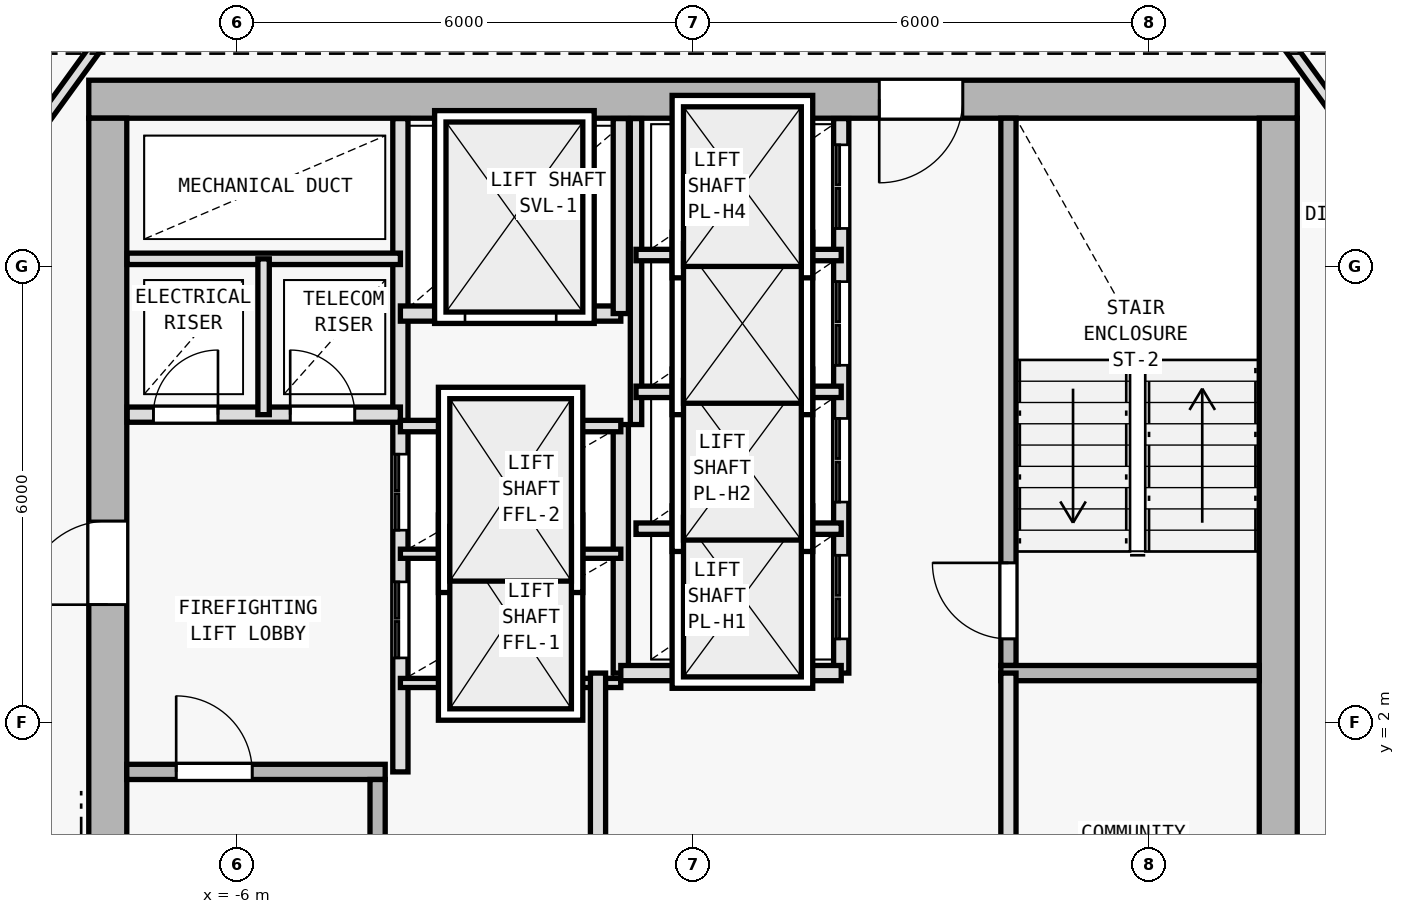
"""IFC4 building model, lengths in metres.
Left out: names, types, materials, properties, quantities, classifications, styles, units other than length and angle.
Written with IfcOpenShell. Run it as: python <this file> out.ifc"""

import sys

from ifc_helpers import new_model, si_unit, direction, frame, frame_2d, origin, origin_2d, place, context, subcontext, project, spatial, rectangle, i_section, extrude, element, fill, save


model = new_model("IFC4")
c1 = context("Model", 3, precision=1e-05, world=origin(), true_north=direction((0.0, 1.0)))
c2 = subcontext(c1, "Body", "Model", "MODEL_VIEW")
j1 = project(units=[si_unit("LENGTHUNIT", "METRE"), si_unit("PLANEANGLEUNIT", "RADIAN")], contexts=[c1])
p1 = place(None, origin())
s1 = spatial("IfcSite", under=j1, at=p1, CompositionType="ELEMENT")
p2 = place(p1, origin())
s2 = spatial("IfcBuilding", under=s1, at=p2, CompositionType="ELEMENT")
p3 = place(p2, frame((0.0, 0.0, 283.2)))
s3 = spatial("IfcBuildingStorey", under=s2, at=p3, CompositionType="ELEMENT", Elevation=283.2)
for number, where, z_axis, x_axis in (
    (1, (7.7, 10.2, 0.0), (0.0, 0.0, 1.0), (1.0, 0.0, 0.0)),
    (2, (-7.7, 10.2, 0.0), (0.0, 0.0, 1.0), (1.0, 0.0, 0.0)),
    (3, (7.7, 0.4, 0.0), (0.0, 0.0, 1.0), (1.0, 0.0, 0.0)),
    (4, (-7.7, 2.0, 0.0), (0.0, 0.0, 1.0), (1.0, 0.0, 0.0)),
):
    element("IfcColumn", number, at=place(p3, frame(where, z_axis=z_axis, x_axis=x_axis)), inside=s3, PredefinedType="COLUMN", context=c2, shape_type="SweptSolid", body=[
        extrude(i_section(OverallWidth=0.374, OverallDepth=0.372, WebThickness=0.012, FlangeThickness=0.02, FilletRadius=0.015, at=origin_2d()), origin(), (0.0, 0.0, 1.0), 3.6),
    ])
p4 = place(p3, frame((7.95, 10.2, 0.0), z_axis=(0.0, 0.0, 1.0), x_axis=(-1.0, 0.0, 0.0)))
e5 = element("IfcWall", 5, at=p4, inside=s3, PredefinedType="SHEAR", context=c2, shape_type="SweptSolid", body=[
    extrude(rectangle(XDim=15.9, YDim=0.5, at=frame_2d((7.95, 0.0))), origin(), (0.0, 0.0, 1.0), 3.35),
])
p5 = place(p4, frame((4.4, 0.0, 0.0)))
e6 = element("IfcOpeningElement", 6, at=p5, cuts=e5, PredefinedType="OPENING", context=c2, shape_type="SweptSolid", body=[
    extrude(rectangle(XDim=1.1, YDim=2.15, at=frame_2d((0.55, 1.075))), frame((0.0, 0.26, 0.0), z_axis=(0.0, -1.0, 0.0), x_axis=(1.0, 0.0, 0.0)), (0.0, 0.0, 1.0), 0.52),
])
p6 = place(p3, frame((-7.7, -9.15, 0.0), z_axis=(0.0, 0.0, 1.0), x_axis=(0.0, 1.0, 0.0)))
e7 = element("IfcWall", 7, at=p6, inside=s3, PredefinedType="SHEAR", context=c2, shape_type="SweptSolid", body=[
    extrude(rectangle(XDim=19.1, YDim=0.5, at=frame_2d((9.55, 0.0))), origin(), (0.0, 0.0, 1.0), 3.35),
])
p7 = place(p6, frame((12.7, 0.0, 0.0)))
e8 = element("IfcOpeningElement", 8, at=p7, cuts=e7, PredefinedType="OPENING", context=c2, shape_type="SweptSolid", body=[
    extrude(rectangle(XDim=1.1, YDim=2.15, at=frame_2d((0.55, 1.075))), frame((0.0, 0.26, 0.0), z_axis=(0.0, -1.0, 0.0), x_axis=(1.0, 0.0, 0.0)), (0.0, 0.0, 1.0), 0.52),
])
p8 = place(p3, frame((7.7, 9.95, 0.0), z_axis=(0.0, 0.0, 1.0), x_axis=(0.0, -1.0, 0.0)))
e9 = element("IfcWall", 9, at=p8, inside=s3, PredefinedType="SHEAR", context=c2, shape_type="SweptSolid", body=[
    extrude(rectangle(XDim=19.1, YDim=0.5, at=frame_2d((9.55, 0.0))), origin(), (0.0, 0.0, 1.0), 3.35),
])
p9 = place(p3, frame((-7.45, 1.35, 0.0), z_axis=(0.0, 0.0, 1.0), x_axis=(1.0, 0.0, 0.0)))
e10 = element("IfcWall", 10, at=p9, inside=s3, PredefinedType="SOLIDWALL", context=c2, shape_type="SweptSolid", body=[
    extrude(rectangle(XDim=3.4, YDim=0.2, at=frame_2d((1.7, 0.0))), origin(), (0.0, 0.0, 1.0), 3.35),
])
p10 = place(p9, frame((0.65, 0.0, 0.0)))
e11 = element("IfcOpeningElement", 11, at=p10, cuts=e10, PredefinedType="OPENING", context=c2, shape_type="SweptSolid", body=[
    extrude(rectangle(XDim=1.0, YDim=2.15, at=frame_2d((0.5, 1.075))), frame((0.0, 0.11, 0.0), z_axis=(0.0, -1.0, 0.0), x_axis=(1.0, 0.0, 0.0)), (0.0, 0.0, 1.0), 0.22),
])
p11 = place(p3, frame((-4.15, -5.95, 0.0), z_axis=(0.0, 0.0, 1.0), x_axis=(0.0, 1.0, 0.0)))
e12 = element("IfcWall", 12, at=p11, inside=s3, PredefinedType="SOLIDWALL", context=c2, shape_type="SweptSolid", body=[
    extrude(rectangle(XDim=7.2, YDim=0.2, at=frame_2d((3.6, 0.0))), origin(), (0.0, 0.0, 1.0), 3.35),
])
p12 = place(p3, frame((-3.85, 1.35, 0.0), z_axis=(0.0, 0.0, 1.0), x_axis=(0.0, 1.0, 0.0)))
e13 = element("IfcWall", 13, at=p12, inside=s3, PredefinedType="SOLIDWALL", context=c2, shape_type="SweptSolid", body=[
    extrude(rectangle(XDim=8.595, YDim=0.2, at=frame_2d((4.297, 0.0))), origin(), (0.0, 0.0, 1.0), 3.35),
])
p13 = place(p12, frame((1.5, 0.0, 0.0)))
e14 = element("IfcOpeningElement", 14, at=p13, cuts=e13, PredefinedType="OPENING", context=c2, shape_type="SweptSolid", body=[
    extrude(rectangle(XDim=1.0, YDim=2.15, at=frame_2d((0.5, 1.075))), frame((0.0, 0.11, 0.0), z_axis=(0.0, -1.0, 0.0), x_axis=(1.0, 0.0, 0.0)), (0.0, 0.0, 1.0), 0.22),
])
p14 = place(p12, frame((3.18, 0.0, 0.0)))
e15 = element("IfcOpeningElement", 15, at=p14, cuts=e13, PredefinedType="OPENING", context=c2, shape_type="SweptSolid", body=[
    extrude(rectangle(XDim=1.0, YDim=2.15, at=frame_2d((0.5, 1.075))), frame((0.0, 0.11, 0.0), z_axis=(0.0, -1.0, 0.0), x_axis=(1.0, 0.0, 0.0)), (0.0, 0.0, 1.0), 0.22),
])
p15 = place(p3, frame((-7.445, 6.05, 0.0), z_axis=(0.0, 0.0, 1.0), x_axis=(1.0, 0.0, 0.0)))
e16 = element("IfcWall", 16, at=p15, inside=s3, PredefinedType="SOLIDWALL", context=c2, shape_type="SweptSolid", body=[
    extrude(rectangle(XDim=3.595, YDim=0.2, at=frame_2d((1.797, 0.0))), origin(), (0.0, 0.0, 1.0), 3.35),
])
p16 = place(p15, frame((0.345, 0.0, 0.0)))
e17 = element("IfcOpeningElement", 17, at=p16, cuts=e16, PredefinedType="OPENING", context=c2, shape_type="SweptSolid", body=[
    extrude(rectangle(XDim=0.85, YDim=2.1, at=frame_2d((0.425, 1.05))), frame((0.0, 0.11, 0.0), z_axis=(0.0, -1.0, 0.0), x_axis=(1.0, 0.0, 0.0)), (0.0, 0.0, 1.0), 0.22),
])
p17 = place(p15, frame((2.145, 0.0, 0.0)))
e18 = element("IfcOpeningElement", 18, at=p17, cuts=e16, PredefinedType="OPENING", context=c2, shape_type="SweptSolid", body=[
    extrude(rectangle(XDim=0.85, YDim=2.1, at=frame_2d((0.425, 1.05))), frame((0.0, 0.11, 0.0), z_axis=(0.0, -1.0, 0.0), x_axis=(1.0, 0.0, 0.0)), (0.0, 0.0, 1.0), 0.22),
])
p18 = place(p3, frame((-7.445, 8.1, 0.0), z_axis=(0.0, 0.0, 1.0), x_axis=(1.0, 0.0, 0.0)))
e19 = element("IfcWall", 19, at=p18, inside=s3, PredefinedType="PARTITIONING", context=c2, shape_type="SweptSolid", body=[
    extrude(rectangle(XDim=3.595, YDim=0.15, at=frame_2d((1.797, 0.0))), origin(), (0.0, 0.0, 1.0), 3.35),
])
p19 = place(p3, frame((-5.65, 6.05, 0.0), z_axis=(0.0, 0.0, 1.0), x_axis=(0.0, 1.0, 0.0)))
e20 = element("IfcWall", 20, at=p19, inside=s3, PredefinedType="PARTITIONING", context=c2, shape_type="SweptSolid", body=[
    extrude(rectangle(XDim=2.05, YDim=0.15, at=frame_2d((1.025, 0.0))), origin(), (0.0, 0.0, 1.0), 3.35),
])
p20 = place(p3, frame((4.15, 2.75, 0.0), z_axis=(0.0, 0.0, 1.0), x_axis=(0.0, 1.0, 0.0)))
e21 = element("IfcWall", 21, at=p20, inside=s3, PredefinedType="SOLIDWALL", context=c2, shape_type="SweptSolid", body=[
    extrude(rectangle(XDim=7.2, YDim=0.2, at=frame_2d((3.6, 0.0))), origin(), (0.0, 0.0, 1.0), 3.35),
])
p21 = place(p20, frame((0.35, 0.0, 0.0)))
e22 = element("IfcOpeningElement", 22, at=p21, cuts=e21, PredefinedType="OPENING", context=c2, shape_type="SweptSolid", body=[
    extrude(rectangle(XDim=1.0, YDim=2.15, at=frame_2d((0.5, 1.075))), frame((0.0, 0.11, 0.0), z_axis=(0.0, -1.0, 0.0), x_axis=(1.0, 0.0, 0.0)), (0.0, 0.0, 1.0), 0.22),
])
p22 = place(p3, frame((4.05, 2.65, 0.0), z_axis=(0.0, 0.0, 1.0), x_axis=(1.0, 0.0, 0.0)))
e23 = element("IfcWall", 23, at=p22, inside=s3, PredefinedType="SOLIDWALL", context=c2, shape_type="SweptSolid", body=[
    extrude(rectangle(XDim=3.4, YDim=0.2, at=frame_2d((1.7, 0.0))), origin(), (0.0, 0.0, 1.0), 3.35),
])
p23 = place(p3, frame((-0.95, 2.65, 0.0), z_axis=(0.0, 0.0, 1.0), x_axis=(0.0, 1.0, 0.0)))
e24 = element("IfcWall", 24, at=p23, inside=s3, PredefinedType="SOLIDWALL", context=c2, shape_type="SweptSolid", body=[
    extrude(rectangle(XDim=3.27, YDim=0.2, at=frame_2d((1.635, 0.0))), origin(), (0.0, 0.0, 1.0), 3.35),
])
for number, where, z_axis, x_axis in (
    (25, (-3.85, 2.52, 0.0), (0.0, 0.0, 1.0), (1.0, 0.0, 0.0)),
    (26, (-3.85, 4.22, 0.0), (0.0, 0.0, 1.0), (1.0, 0.0, 0.0)),
):
    element("IfcWall", number, at=place(p3, frame(where, z_axis=z_axis, x_axis=x_axis)), inside=s3, PredefinedType="PARTITIONING", context=c2, shape_type="SweptSolid", body=[
        extrude(rectangle(XDim=2.9, YDim=0.12, at=frame_2d((1.45, 0.0))), origin(), (0.0, 0.0, 1.0), 3.35),
    ])
p24 = place(p3, frame((-3.85, 5.9, 0.0), z_axis=(0.0, 0.0, 1.0), x_axis=(1.0, 0.0, 0.0)))
e27 = element("IfcWall", 27, at=p24, inside=s3, PredefinedType="PARTITIONING", context=c2, shape_type="SweptSolid", body=[
    extrude(rectangle(XDim=2.9, YDim=0.15, at=frame_2d((1.45, 0.0))), origin(), (0.0, 0.0, 1.0), 3.35),
])
p25 = place(p3, frame((-3.85, 7.38, 0.0), z_axis=(0.0, 0.0, 1.0), x_axis=(1.0, 0.0, 0.0)))
e28 = element("IfcWall", 28, at=p25, inside=s3, PredefinedType="SOLIDWALL", context=c2, shape_type="SweptSolid", body=[
    extrude(rectangle(XDim=2.9, YDim=0.2, at=frame_2d((1.45, 0.0))), origin(), (0.0, 0.0, 1.0), 3.35),
])
p26 = place(p25, frame((0.85, 0.0, 0.0)))
e29 = element("IfcOpeningElement", 29, at=p26, cuts=e28, PredefinedType="OPENING", context=c2, shape_type="SweptSolid", body=[
    extrude(rectangle(XDim=1.2, YDim=2.2, at=frame_2d((0.6, 1.1))), frame((0.0, 0.11, 0.0), z_axis=(0.0, -1.0, 0.0), x_axis=(1.0, 0.0, 0.0)), (0.0, 0.0, 1.0), 0.22),
])
p27 = place(p3, frame((-0.95, 7.38, 0.0), z_axis=(0.0, 0.0, 1.0), x_axis=(0.0, 1.0, 0.0)))
e30 = element("IfcWall", 30, at=p27, inside=s3, PredefinedType="SOLIDWALL", context=c2, shape_type="SweptSolid", body=[
    extrude(rectangle(XDim=2.565, YDim=0.2, at=frame_2d((1.283, 0.0))), origin(), (0.0, 0.0, 1.0), 3.35),
])
p28 = place(p3, frame((4.15, -6.05, 0.0), z_axis=(0.0, 0.0, 1.0), x_axis=(0.0, 1.0, 0.0)))
e31 = element("IfcWall", 31, at=p28, inside=s3, PredefinedType="SOLIDWALL", context=c2, shape_type="SweptSolid", body=[
    extrude(rectangle(XDim=8.7, YDim=0.2, at=frame_2d((4.35, 0.0))), origin(), (0.0, 0.0, 1.0), 3.35),
])
p29 = place(p28, frame((3.6, 0.0, 0.0)))
e32 = element("IfcOpeningElement", 32, at=p29, cuts=e31, PredefinedType="OPENING", context=c2, shape_type="SweptSolid", body=[
    extrude(rectangle(XDim=0.95, YDim=2.1, at=frame_2d((0.475, 1.05))), frame((0.0, 0.11, 0.0), z_axis=(0.0, -1.0, 0.0), x_axis=(1.0, 0.0, 0.0)), (0.0, 0.0, 1.0), 0.22),
])
p30 = place(p3, frame((-1.25, -6.05, 0.0), z_axis=(0.0, 0.0, 1.0), x_axis=(0.0, 1.0, 0.0)))
e33 = element("IfcWall", 33, at=p30, inside=s3, PredefinedType="SOLIDWALL", context=c2, shape_type="SweptSolid", body=[
    extrude(rectangle(XDim=8.7, YDim=0.2, at=frame_2d((4.35, 0.0))), origin(), (0.0, 0.0, 1.0), 3.35),
])
p31 = place(p30, frame((3.4, 0.0, 0.0)))
e34 = element("IfcOpeningElement", 34, at=p31, cuts=e33, PredefinedType="OPENING", context=c2, shape_type="SweptSolid", body=[
    extrude(rectangle(XDim=0.95, YDim=2.1, at=frame_2d((0.475, 1.05))), frame((0.0, 0.11, 0.0), z_axis=(0.0, -1.0, 0.0), x_axis=(1.0, 0.0, 0.0)), (0.0, 0.0, 1.0), 0.22),
])
p32 = place(p3, frame((1.95, 2.65, 0.0), z_axis=(0.0, 0.0, 1.0), x_axis=(0.0, 1.0, 0.0)))
e35 = element("IfcWall", 35, at=p32, inside=s3, PredefinedType="SOLIDWALL", context=c2, shape_type="SweptSolid", body=[
    extrude(rectangle(XDim=7.295, YDim=0.2, at=frame_2d((3.647, 0.0))), origin(), (0.0, 0.0, 1.0), 3.35),
])
p33 = place(p32, frame((0.45, 0.0, 0.0)))
e36 = element("IfcOpeningElement", 36, at=p33, cuts=e35, PredefinedType="OPENING", context=c2, shape_type="SweptSolid", body=[
    extrude(rectangle(XDim=1.1, YDim=2.15, at=frame_2d((0.55, 1.075))), frame((0.0, 0.11, 0.0), z_axis=(0.0, -1.0, 0.0), x_axis=(1.0, 0.0, 0.0)), (0.0, 0.0, 1.0), 0.22),
])
p34 = place(p32, frame((2.25, 0.0, 0.0)))
e37 = element("IfcOpeningElement", 37, at=p34, cuts=e35, PredefinedType="OPENING", context=c2, shape_type="SweptSolid", body=[
    extrude(rectangle(XDim=1.1, YDim=2.15, at=frame_2d((0.55, 1.075))), frame((0.0, 0.11, 0.0), z_axis=(0.0, -1.0, 0.0), x_axis=(1.0, 0.0, 0.0)), (0.0, 0.0, 1.0), 0.22),
])
p35 = place(p32, frame((4.05, 0.0, 0.0)))
e38 = element("IfcOpeningElement", 38, at=p35, cuts=e35, PredefinedType="OPENING", context=c2, shape_type="SweptSolid", body=[
    extrude(rectangle(XDim=1.1, YDim=2.15, at=frame_2d((0.55, 1.075))), frame((0.0, 0.11, 0.0), z_axis=(0.0, -1.0, 0.0), x_axis=(1.0, 0.0, 0.0)), (0.0, 0.0, 1.0), 0.22),
])
p36 = place(p32, frame((5.85, 0.0, 0.0)))
e39 = element("IfcOpeningElement", 39, at=p36, cuts=e35, PredefinedType="OPENING", context=c2, shape_type="SweptSolid", body=[
    extrude(rectangle(XDim=1.1, YDim=2.15, at=frame_2d((0.55, 1.075))), frame((0.0, 0.11, 0.0), z_axis=(0.0, -1.0, 0.0), x_axis=(1.0, 0.0, 0.0)), (0.0, 0.0, 1.0), 0.22),
])
p37 = place(p3, frame((-0.95, 2.65, 0.0), z_axis=(0.0, 0.0, 1.0), x_axis=(1.0, 0.0, 0.0)))
e40 = element("IfcWall", 40, at=p37, inside=s3, PredefinedType="SOLIDWALL", context=c2, shape_type="SweptSolid", body=[
    extrude(rectangle(XDim=2.9, YDim=0.2, at=frame_2d((1.45, 0.0))), origin(), (0.0, 0.0, 1.0), 3.35),
])
p38 = place(p3, frame((-0.75, 5.92, 0.0), z_axis=(0.0, 0.0, 1.0), x_axis=(0.0, 1.0, 0.0)))
e41 = element("IfcWall", 41, at=p38, inside=s3, PredefinedType="PARTITIONING", context=c2, shape_type="SweptSolid", body=[
    extrude(rectangle(XDim=4.025, YDim=0.15, at=frame_2d((2.013, 0.0))), origin(), (0.0, 0.0, 1.0), 3.35),
])
for number, where, z_axis, x_axis in (
    (42, (-0.75, 4.55, 0.0), (0.0, 0.0, 1.0), (1.0, 0.0, 0.0)),
    (43, (-0.75, 6.35, 0.0), (0.0, 0.0, 1.0), (1.0, 0.0, 0.0)),
    (44, (-0.75, 8.15, 0.0), (0.0, 0.0, 1.0), (1.0, 0.0, 0.0)),
):
    element("IfcWall", number, at=place(p3, frame(where, z_axis=z_axis, x_axis=x_axis)), inside=s3, PredefinedType="PARTITIONING", context=c2, shape_type="SweptSolid", body=[
        extrude(rectangle(XDim=2.7, YDim=0.15, at=frame_2d((1.35, 0.0))), origin(), (0.0, 0.0, 1.0), 3.35),
    ])
p39 = place(p3, frame((-9.78, 8.226, 0.0), z_axis=(0.0, 0.0, 1.0), x_axis=(0.586956386413, 0.809618552436, 0.0)))
e45 = element("IfcWall", 45, at=p39, inside=s3, PredefinedType="PARTITIONING", context=c2, shape_type="SweptSolid", body=[
    extrude(rectangle(XDim=5.008, YDim=0.15, at=frame_2d((2.504, 0.0))), origin(), (0.0, 0.0, 1.0), 3.015),
])
p40 = place(p3, frame((6.841, 12.28, 0.0), z_axis=(0.0, 0.0, 1.0), x_axis=(0.586956386413, -0.809618552436, 0.0)))
e46 = element("IfcWall", 46, at=p40, inside=s3, PredefinedType="PARTITIONING", context=c2, shape_type="SweptSolid", body=[
    extrude(rectangle(XDim=5.008, YDim=0.15, at=frame_2d((2.504, 0.0))), origin(), (0.0, 0.0, 1.0), 2.775),
])
p41 = place(p40, frame((2.954, 0.0, 0.0)))
e47 = element("IfcOpeningElement", 47, at=p41, cuts=e46, PredefinedType="OPENING", context=c2, shape_type="SweptSolid", body=[
    extrude(rectangle(XDim=0.9, YDim=2.1, at=frame_2d((0.45, 1.05))), frame((0.0, 0.085, 0.0), z_axis=(0.0, -1.0, 0.0), x_axis=(1.0, 0.0, 0.0)), (0.0, 0.0, 1.0), 0.17),
])
p42 = place(p7, origin())
e48 = element("IfcDoor", 48, at=p42, inside=s3, OperationType="SINGLE_SWING_LEFT", PredefinedType="DOOR", context=c2, shape_type="SweptSolid", body=[
    extrude(rectangle(XDim=1.1, YDim=2.15, at=frame_2d((0.55, 1.075))), frame((0.0, 0.025, 0.0), z_axis=(0.0, -1.0, 0.0), x_axis=(1.0, 0.0, 0.0)), (0.0, 0.0, 1.0), 0.05),
])
fill(e8, e48)
p43 = place(p5, origin())
e49 = element("IfcDoor", 49, at=p43, inside=s3, OperationType="SINGLE_SWING_RIGHT", PredefinedType="DOOR", context=c2, shape_type="SweptSolid", body=[
    extrude(rectangle(XDim=1.1, YDim=2.15, at=frame_2d((0.55, 1.075))), frame((0.0, 0.025, 0.0), z_axis=(0.0, -1.0, 0.0), x_axis=(1.0, 0.0, 0.0)), (0.0, 0.0, 1.0), 0.05),
])
fill(e6, e49)
p44 = place(p10, origin())
e50 = element("IfcDoor", 50, at=p44, inside=s3, OperationType="SINGLE_SWING_LEFT", PredefinedType="DOOR", context=c2, shape_type="SweptSolid", body=[
    extrude(rectangle(XDim=1.0, YDim=2.15, at=frame_2d((0.5, 1.075))), frame((0.0, 0.025, 0.0), z_axis=(0.0, -1.0, 0.0), x_axis=(1.0, 0.0, 0.0)), (0.0, 0.0, 1.0), 0.05),
])
fill(e11, e50)
p45 = place(p16, origin())
e51 = element("IfcDoor", 51, at=p45, inside=s3, OperationType="SINGLE_SWING_RIGHT", PredefinedType="DOOR", context=c2, shape_type="SweptSolid", body=[
    extrude(rectangle(XDim=0.85, YDim=2.1, at=frame_2d((0.425, 1.05))), frame((0.0, 0.025, 0.0), z_axis=(0.0, -1.0, 0.0), x_axis=(1.0, 0.0, 0.0)), (0.0, 0.0, 1.0), 0.05),
])
fill(e17, e51)
p46 = place(p17, origin())
e52 = element("IfcDoor", 52, at=p46, inside=s3, OperationType="SINGLE_SWING_LEFT", PredefinedType="DOOR", context=c2, shape_type="SweptSolid", body=[
    extrude(rectangle(XDim=0.85, YDim=2.1, at=frame_2d((0.425, 1.05))), frame((0.0, 0.025, 0.0), z_axis=(0.0, -1.0, 0.0), x_axis=(1.0, 0.0, 0.0)), (0.0, 0.0, 1.0), 0.05),
])
fill(e18, e52)
p47 = place(p21, origin())
e53 = element("IfcDoor", 53, at=p47, inside=s3, OperationType="SINGLE_SWING_RIGHT", PredefinedType="DOOR", context=c2, shape_type="SweptSolid", body=[
    extrude(rectangle(XDim=1.0, YDim=2.15, at=frame_2d((0.5, 1.075))), frame((0.0, 0.025, 0.0), z_axis=(0.0, -1.0, 0.0), x_axis=(1.0, 0.0, 0.0)), (0.0, 0.0, 1.0), 0.05),
])
fill(e22, e53)
p48 = place(p26, origin())
e54 = element("IfcDoor", 54, at=p48, inside=s3, OperationType="DOUBLE_DOOR_SLIDING", PredefinedType="DOOR", context=c2, shape_type="SweptSolid", body=[
    extrude(rectangle(XDim=1.2, YDim=2.2, at=frame_2d((0.6, 1.1))), frame((0.0, 0.025, 0.0), z_axis=(0.0, -1.0, 0.0), x_axis=(1.0, 0.0, 0.0)), (0.0, 0.0, 1.0), 0.05),
])
fill(e29, e54)
p49 = place(p33, origin())
e55 = element("IfcDoor", 55, at=p49, inside=s3, OperationType="DOUBLE_DOOR_SLIDING", PredefinedType="DOOR", context=c2, shape_type="SweptSolid", body=[
    extrude(rectangle(XDim=1.1, YDim=2.15, at=frame_2d((0.55, 1.075))), frame((0.0, 0.025, 0.0), z_axis=(0.0, -1.0, 0.0), x_axis=(1.0, 0.0, 0.0)), (0.0, 0.0, 1.0), 0.05),
])
fill(e36, e55)
p50 = place(p34, origin())
e56 = element("IfcDoor", 56, at=p50, inside=s3, OperationType="DOUBLE_DOOR_SLIDING", PredefinedType="DOOR", context=c2, shape_type="SweptSolid", body=[
    extrude(rectangle(XDim=1.1, YDim=2.15, at=frame_2d((0.55, 1.075))), frame((0.0, 0.025, 0.0), z_axis=(0.0, -1.0, 0.0), x_axis=(1.0, 0.0, 0.0)), (0.0, 0.0, 1.0), 0.05),
])
fill(e37, e56)
p51 = place(p35, origin())
e57 = element("IfcDoor", 57, at=p51, inside=s3, OperationType="DOUBLE_DOOR_SLIDING", PredefinedType="DOOR", context=c2, shape_type="SweptSolid", body=[
    extrude(rectangle(XDim=1.1, YDim=2.15, at=frame_2d((0.55, 1.075))), frame((0.0, 0.025, 0.0), z_axis=(0.0, -1.0, 0.0), x_axis=(1.0, 0.0, 0.0)), (0.0, 0.0, 1.0), 0.05),
])
fill(e38, e57)
p52 = place(p36, origin())
e58 = element("IfcDoor", 58, at=p52, inside=s3, OperationType="DOUBLE_DOOR_SLIDING", PredefinedType="DOOR", context=c2, shape_type="SweptSolid", body=[
    extrude(rectangle(XDim=1.1, YDim=2.15, at=frame_2d((0.55, 1.075))), frame((0.0, 0.025, 0.0), z_axis=(0.0, -1.0, 0.0), x_axis=(1.0, 0.0, 0.0)), (0.0, 0.0, 1.0), 0.05),
])
fill(e39, e58)
p53 = place(p13, origin())
e59 = element("IfcDoor", 59, at=p53, inside=s3, OperationType="DOUBLE_DOOR_SLIDING", PredefinedType="DOOR", context=c2, shape_type="SweptSolid", body=[
    extrude(rectangle(XDim=1.0, YDim=2.15, at=frame_2d((0.5, 1.075))), frame((0.0, 0.025, 0.0), z_axis=(0.0, -1.0, 0.0), x_axis=(1.0, 0.0, 0.0)), (0.0, 0.0, 1.0), 0.05),
])
fill(e14, e59)
p54 = place(p14, origin())
e60 = element("IfcDoor", 60, at=p54, inside=s3, OperationType="DOUBLE_DOOR_SLIDING", PredefinedType="DOOR", context=c2, shape_type="SweptSolid", body=[
    extrude(rectangle(XDim=1.0, YDim=2.15, at=frame_2d((0.5, 1.075))), frame((0.0, 0.025, 0.0), z_axis=(0.0, -1.0, 0.0), x_axis=(1.0, 0.0, 0.0)), (0.0, 0.0, 1.0), 0.05),
])
fill(e15, e60)
save(model, sys.argv[1])
